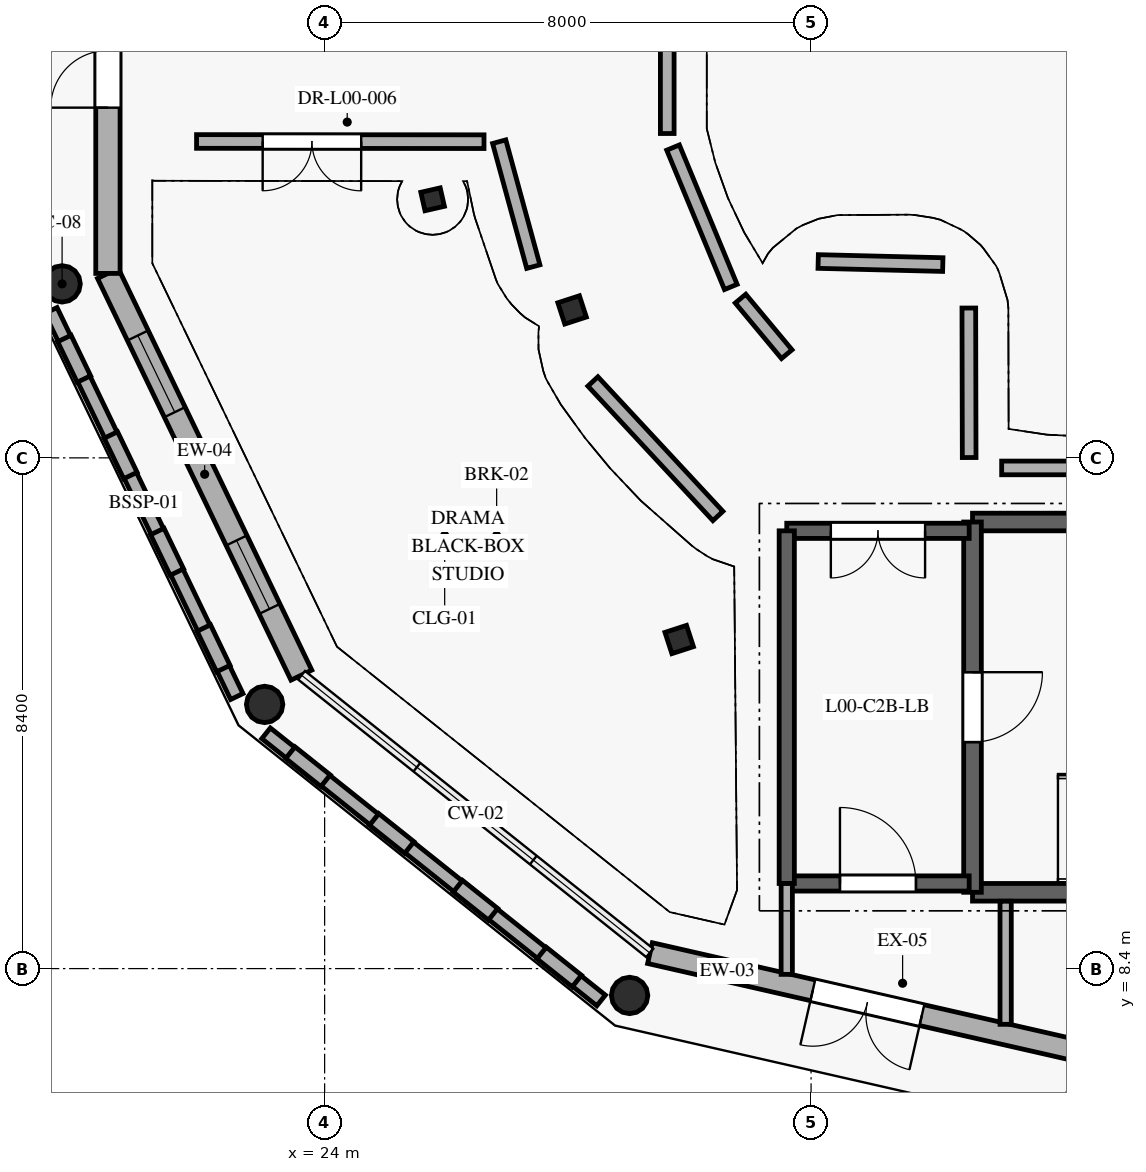
"""IFC4 building model, lengths in metres.
Left out: names, types, materials, properties, quantities, classifications, styles, units other than length and angle.
Written with IfcOpenShell. Run it as: python <this file> out.ifc"""

import sys

from ifc_helpers import new_model, si_unit, direction, frame, frame_2d, origin, origin_2d, place, context, subcontext, project, spatial, rectangle, circle, i_section, extrude, element, fill, save


model = new_model("IFC4")
c1 = context("Model", 3, precision=1e-05, world=origin(), true_north=direction((0.0, 1.0)))
c2 = subcontext(c1, "Body", "Model", "MODEL_VIEW")
j1 = project(units=[si_unit("LENGTHUNIT", "METRE"), si_unit("PLANEANGLEUNIT", "RADIAN")], contexts=[c1])
p1 = place(None, origin())
s1 = spatial("IfcSite", under=j1, at=p1, CompositionType="ELEMENT")
p2 = place(p1, origin())
s2 = spatial("IfcBuilding", under=s1, at=p2, CompositionType="ELEMENT")
p3 = place(p2, origin())
s3 = spatial("IfcBuildingStorey", under=s2, at=p3, CompositionType="ELEMENT", Elevation=0.0)
for number, where, z_axis, x_axis in (
    (1, (29.831, 13.812, 0.0), (0.0, 0.0, 1.0), (0.951, 0.309, 0.0)),
    (2, (28.07, 19.233, 0.0), (0.0, 0.0, 1.0), (0.951, 0.309, 0.0)),
):
    element("IfcColumn", number, at=place(p3, frame(where, z_axis=z_axis, x_axis=x_axis)), inside=s3, PredefinedType="COLUMN", context=c2, shape_type="SweptSolid", body=[
        extrude(i_section(OverallWidth=0.373, OverallDepth=0.368, WebThickness=0.014, FlangeThickness=0.024, FilletRadius=0.015, at=origin_2d()), origin(), (0.0, 0.0, 1.0), 4.2),
    ])
for number, where, z_axis, x_axis in (
    (3, (19.683, 19.662, 0.0), (0.0, 0.0, 1.0), (0.223, -0.975, 0.0)),
    (4, (23.013, 12.745, 0.0), (0.0, 0.0, 1.0), (0.623, -0.782, 0.0)),
    (5, (29.015, 7.958, 0.0), (0.0, 0.0, 1.0), (0.901, -0.434, 0.0)),
):
    element("IfcColumn", number, at=place(p3, frame(where, z_axis=z_axis, x_axis=x_axis)), inside=s3, PredefinedType="COLUMN", context=c2, shape_type="SweptSolid", body=[
        extrude(circle(Radius=0.3, at=origin_2d()), origin(), (0.0, 0.0, 1.0), 4.2),
    ])
p4 = place(p3, frame((25.776, 21.052, 0.0), z_axis=(0.0, 0.0, 1.0), x_axis=(0.222569549971, -0.974916814618, 0.0)))
e6 = element("IfcColumn", 6, at=p4, inside=s3, PredefinedType="COLUMN", context=c2, shape_type="SweptSolid", body=[
    extrude(i_section(OverallWidth=0.311, OverallDepth=0.327, WebThickness=0.016, FlangeThickness=0.025, FilletRadius=0.015, at=origin_2d()), origin(), (0.0, 0.0, 1.0), 4.2),
])
p5 = place(p3, frame((36.5, 7.023, 0.0), z_axis=(0.0, 0.0, 1.0), x_axis=(-0.974932633187, 0.222500248868, 0.0)))
e7 = element("IfcWall", 7, at=p5, inside=s3, PredefinedType="SOLIDWALL", context=c2, shape_type="SweptSolid", body=[
    extrude(rectangle(XDim=7.333, YDim=0.35, at=frame_2d((3.667, 0.0))), origin(), (0.0, 0.0, 1.0), 3.94),
])
p6 = place(p5, frame((2.747, 0.0, 0.0)))
e8 = element("IfcOpeningElement", 8, at=p6, cuts=e7, PredefinedType="OPENING", context=c2, shape_type="SweptSolid", body=[
    extrude(rectangle(XDim=1.84, YDim=2.16, at=frame_2d((0.92, 1.08))), frame((0.0, 0.185, 0.0), z_axis=(0.0, -1.0, 0.0), x_axis=(1.0, 0.0, 0.0)), (0.0, 0.0, 1.0), 0.37),
])
p7 = place(p3, frame((23.618, 13.227, 0.0), z_axis=(0.0, 0.0, 1.0), x_axis=(-0.433886691468, 0.900967446119, 0.0)))
e9 = element("IfcWall", 9, at=p7, inside=s3, PredefinedType="SOLIDWALL", context=c2, shape_type="SweptSolid", body=[
    extrude(rectangle(XDim=7.333, YDim=0.38, at=frame_2d((3.667, 0.0))), origin(), (0.0, 0.0, 1.0), 3.94),
])
p8 = place(p7, frame((1.208, 0.0, 0.85)))
e10 = element("IfcOpeningElement", 10, at=p8, cuts=e9, PredefinedType="OPENING", context=c2, shape_type="SweptSolid", body=[
    extrude(rectangle(XDim=1.25, YDim=1.4, at=frame_2d((0.625, 0.7))), frame((0.0, 0.2, 0.0), z_axis=(0.0, -1.0, 0.0), x_axis=(1.0, 0.0, 0.0)), (0.0, 0.0, 1.0), 0.4),
])
p9 = place(p7, frame((4.8, 0.0, 0.85)))
e11 = element("IfcOpeningElement", 11, at=p9, cuts=e9, PredefinedType="OPENING", context=c2, shape_type="SweptSolid", body=[
    extrude(rectangle(XDim=1.4, YDim=1.4, at=frame_2d((0.7, 0.7))), frame((0.0, 0.2, 0.0), z_axis=(0.0, -1.0, 0.0), x_axis=(1.0, 0.0, 0.0)), (0.0, 0.0, 1.0), 0.4),
])
p10 = place(p3, frame((20.436, 19.833, 0.0), z_axis=(0.0, 0.0, 1.0), x_axis=(0.0, 1.0, 0.0)))
e12 = element("IfcWall", 12, at=p10, inside=s3, PredefinedType="SOLIDWALL", context=c2, shape_type="SweptSolid", body=[
    extrude(rectangle(XDim=7.333, YDim=0.4, at=frame_2d((3.667, 0.0))), origin(), (0.0, 0.0, 1.0), 3.94),
])
p11 = place(p10, frame((2.726, 0.0, 0.0)))
e13 = element("IfcOpeningElement", 13, at=p11, cuts=e12, PredefinedType="OPENING", context=c2, shape_type="SweptSolid", body=[
    extrude(rectangle(XDim=1.88, YDim=2.18, at=frame_2d((0.94, 1.09))), frame((0.0, 0.21, 0.0), z_axis=(0.0, -1.0, 0.0), x_axis=(1.0, 0.0, 0.0)), (0.0, 0.0, 1.0), 0.42),
])
p12 = place(p3, frame((19.498, 19.223, 0.0), z_axis=(0.0, 0.0, 1.0), x_axis=(0.433873953058, -0.900973580555, 0.0)))
e14 = element("IfcWall", 14, at=p12, inside=s3, PredefinedType="ELEMENTEDWALL", context=c2, shape_type="SweptSolid", body=[
    extrude(rectangle(XDim=7.047, YDim=0.225, at=frame_2d((3.523, 0.0))), origin(), (0.0, 0.0, 1.0), 0.55),
])
for number, where, z_axis, x_axis in (
    (15, (19.72, 18.763, 0.55), (0.0, 0.0, 1.0), (0.434, -0.901, 0.0)),
    (16, (20.484, 17.176, 0.55), (0.0, 0.0, 1.0), (0.434, -0.901, 0.0)),
    (17, (21.249, 15.589, 0.55), (0.0, 0.0, 1.0), (0.434, -0.901, 0.0)),
    (18, (22.013, 14.001, 0.55), (0.0, 0.0, 1.0), (0.434, -0.901, 0.0)),
):
    element("IfcWall", number, at=place(p3, frame(where, z_axis=z_axis, x_axis=x_axis)), inside=s3, PredefinedType="ELEMENTEDWALL", context=c2, shape_type="SweptSolid", body=[
        extrude(rectangle(XDim=0.74, YDim=0.245, at=frame_2d((0.37, 0.0))), origin(), (0.0, 0.0, 1.0), 3.39),
    ])
p13 = place(p3, frame((23.037, 12.27, 0.0), z_axis=(0.0, 0.0, 1.0), x_axis=(0.781821002863, -0.623502942641, 0.0)))
e19 = element("IfcWall", 19, at=p13, inside=s3, PredefinedType="ELEMENTEDWALL", context=c2, shape_type="SweptSolid", body=[
    extrude(rectangle(XDim=7.047, YDim=0.225, at=frame_2d((3.524, 0.0))), origin(), (0.0, 0.0, 1.0), 0.55),
])
for number, where, z_axis, x_axis in (
    (20, (23.437, 11.952, 0.55), (0.0, 0.0, 1.0), (0.782, -0.623, 0.0)),
    (21, (24.814, 10.853, 0.55), (0.0, 0.0, 1.0), (0.782, -0.624, 0.0)),
    (22, (26.191, 9.755, 0.55), (0.0, 0.0, 1.0), (0.782, -0.623, 0.0)),
    (23, (27.569, 8.656, 0.55), (0.0, 0.0, 1.0), (0.782, -0.623, 0.0)),
):
    element("IfcWall", number, at=place(p3, frame(where, z_axis=z_axis, x_axis=x_axis)), inside=s3, PredefinedType="ELEMENTEDWALL", context=c2, shape_type="SweptSolid", body=[
        extrude(rectangle(XDim=0.74, YDim=0.245, at=frame_2d((0.37, 0.0))), origin(), (0.0, 0.0, 1.0), 3.39),
    ])
for number, where, z_axis, x_axis in (
    (24, (34.655, 9.655, 0.0), (0.0, 0.0, 1.0), (1.0, 0.0, 0.0)),
    (25, (41.445, 15.745, 0.0), (0.0, 0.0, 1.0), (-1.0, 0.0, 0.0)),
):
    element("IfcWall", number, at=place(p3, frame(where, z_axis=z_axis, x_axis=x_axis)), inside=s3, PredefinedType="SHEAR", context=c2, shape_type="SweptSolid", body=[
        extrude(rectangle(XDim=6.79, YDim=0.29, at=frame_2d((3.395, 0.0))), origin(), (0.0, 0.0, 1.0), 3.95),
    ])
p14 = place(p3, frame((34.655, 15.745, 0.0), z_axis=(0.0, 0.0, 1.0), x_axis=(0.0, -1.0, 0.0)))
e26 = element("IfcWall", 26, at=p14, inside=s3, PredefinedType="SHEAR", context=c2, shape_type="SweptSolid", body=[
    extrude(rectangle(XDim=6.09, YDim=0.29, at=frame_2d((3.045, 0.0))), origin(), (0.0, 0.0, 1.0), 3.95),
])
p15 = place(p14, frame((2.47, 0.0, 0.0)))
e27 = element("IfcOpeningElement", 27, at=p15, cuts=e26, PredefinedType="OPENING", context=c2, shape_type="SweptSolid", body=[
    extrude(rectangle(XDim=1.15, YDim=2.1, at=frame_2d((0.575, 1.05))), frame((0.0, 0.155, 0.0), z_axis=(0.0, -1.0, 0.0), x_axis=(1.0, 0.0, 0.0)), (0.0, 0.0, 1.0), 0.31),
])
p16 = place(p3, frame((31.6, 9.8, 0.0), z_axis=(0.0, 0.0, 1.0), x_axis=(1.0, 0.0, 0.0)))
e28 = element("IfcWall", 28, at=p16, inside=s3, PredefinedType="SHEAR", context=c2, shape_type="SweptSolid", body=[
    extrude(rectangle(XDim=3.0, YDim=0.25, at=frame_2d((1.5, 0.0))), origin(), (0.0, 0.0, 1.0), 3.95),
])
p17 = place(p16, frame((0.875, 0.0, 0.0)))
e29 = element("IfcOpeningElement", 29, at=p17, cuts=e28, PredefinedType="OPENING", context=c2, shape_type="SweptSolid", body=[
    extrude(rectangle(XDim=1.25, YDim=2.1, at=frame_2d((0.625, 1.05))), frame((0.0, 0.135, 0.0), z_axis=(0.0, -1.0, 0.0), x_axis=(1.0, 0.0, 0.0)), (0.0, 0.0, 1.0), 0.27),
])
p18 = place(p3, frame((34.6, 15.6, 0.0), z_axis=(0.0, 0.0, 1.0), x_axis=(-1.0, 0.0, 0.0)))
e30 = element("IfcWall", 30, at=p18, inside=s3, PredefinedType="SHEAR", context=c2, shape_type="SweptSolid", body=[
    extrude(rectangle(XDim=3.0, YDim=0.25, at=frame_2d((1.5, 0.0))), origin(), (0.0, 0.0, 1.0), 3.95),
])
p19 = place(p18, frame((0.725, 0.0, 0.0)))
e31 = element("IfcOpeningElement", 31, at=p19, cuts=e30, PredefinedType="OPENING", context=c2, shape_type="SweptSolid", body=[
    extrude(rectangle(XDim=1.55, YDim=2.15, at=frame_2d((0.775, 1.075))), frame((0.0, 0.135, 0.0), z_axis=(0.0, -1.0, 0.0), x_axis=(1.0, 0.0, 0.0)), (0.0, 0.0, 1.0), 0.27),
])
p20 = place(p3, frame((31.6, 15.6, 0.0), z_axis=(0.0, 0.0, 1.0), x_axis=(0.0, -1.0, 0.0)))
e32 = element("IfcWall", 32, at=p20, inside=s3, PredefinedType="SHEAR", context=c2, shape_type="SweptSolid", body=[
    extrude(rectangle(XDim=5.8, YDim=0.25, at=frame_2d((2.9, 0.0))), origin(), (0.0, 0.0, 1.0), 3.95),
])
p21 = place(p3, frame((35.2, 7.483, 0.0), z_axis=(0.0, 0.0, 1.0), x_axis=(0.0, 1.0, 0.0)))
e33 = element("IfcWall", 33, at=p21, inside=s3, PredefinedType="PARTITIONING", context=c2, shape_type="SweptSolid", body=[
    extrude(rectangle(XDim=2.025, YDim=0.185, at=frame_2d((1.012, 0.0))), origin(), (0.0, 0.0, 1.0), 3.93),
])
p22 = place(p3, frame((31.6, 9.799, 0.0), z_axis=(0.0, 0.0, 1.0), x_axis=(0.0, -1.0, 0.0)))
e34 = element("IfcWall", 34, at=p22, inside=s3, PredefinedType="PARTITIONING", context=c2, shape_type="SweptSolid", body=[
    extrude(rectangle(XDim=1.494, YDim=0.185, at=frame_2d((0.747, 0.0))), origin(), (0.0, 0.0, 1.0), 3.93),
])
p23 = place(p3, frame((30.468, 15.844, 0.0), z_axis=(0.0, 0.0, 1.0), x_axis=(-0.680599903588, 0.732655288138, 0.0)))
e35 = element("IfcWall", 35, at=p23, inside=s3, PredefinedType="PARTITIONING", context=c2, shape_type="SweptSolid", body=[
    extrude(rectangle(XDim=3.02, YDim=0.225, at=frame_2d((1.51, 0.0))), origin(), (0.0, 0.0, 1.0), 3.93),
])
p24 = place(p3, frame((27.432, 19.945, 0.0), z_axis=(0.0, 0.0, 1.0), x_axis=(-0.263515032184, 0.964655289631, 0.0)))
e36 = element("IfcWall", 36, at=p24, inside=s3, PredefinedType="PARTITIONING", context=c2, shape_type="SweptSolid", body=[
    extrude(rectangle(XDim=2.13, YDim=0.225, at=frame_2d((1.065, 0.0))), origin(), (0.0, 0.0, 1.0), 3.93),
])
p25 = place(p3, frame((26.621, 22.0, 0.0), z_axis=(0.0, 0.0, 1.0), x_axis=(-0.999999738615, 0.000723028267, 0.0)))
e37 = element("IfcWall", 37, at=p25, inside=s3, PredefinedType="PARTITIONING", context=c2, shape_type="SweptSolid", body=[
    extrude(rectangle(XDim=4.727, YDim=0.225, at=frame_2d((2.364, 0.0))), origin(), (0.0, 0.0, 1.0), 3.93),
])
p26 = place(p25, frame((2.02, 0.0, 0.0)))
e38 = element("IfcOpeningElement", 38, at=p26, cuts=e37, PredefinedType="OPENING", context=c2, shape_type="SweptSolid", body=[
    extrude(rectangle(XDim=1.62, YDim=2.18, at=frame_2d((0.81, 1.09))), frame((0.0, 0.123, 0.0), z_axis=(0.0, -1.0, 0.0), x_axis=(1.0, 0.0, 0.0)), (0.0, 0.0, 1.0), 0.245),
])
p27 = place(p3, frame((29.635, 24.615, 0.0), z_axis=(0.0, 0.0, 1.0), x_axis=(0.0, -1.0, 0.0)))
e39 = element("IfcWall", 39, at=p27, inside=s3, PredefinedType="PARTITIONING", context=c2, shape_type="SweptSolid", body=[
    extrude(rectangle(XDim=2.481, YDim=0.225, at=frame_2d((1.24, 0.0))), origin(), (0.0, 0.0, 1.0), 3.93),
])
p28 = place(p3, frame((29.73, 21.903, 0.0), z_axis=(0.0, 0.0, 1.0), x_axis=(0.382679137355, -0.923881311551, 0.0)))
e40 = element("IfcWall", 40, at=p28, inside=s3, PredefinedType="PARTITIONING", context=c2, shape_type="SweptSolid", body=[
    extrude(rectangle(XDim=2.481, YDim=0.225, at=frame_2d((1.241, 0.0))), origin(), (0.0, 0.0, 1.0), 3.93),
])
p29 = place(p3, frame((30.84, 19.419, 0.0), z_axis=(0.0, 0.0, 1.0), x_axis=(0.63967929126, -0.76864192205, 0.0)))
e41 = element("IfcWall", 41, at=p29, inside=s3, PredefinedType="PARTITIONING", context=c2, shape_type="SweptSolid", body=[
    extrude(rectangle(XDim=1.189, YDim=0.225, at=frame_2d((0.594, 0.0))), origin(), (0.0, 0.0, 1.0), 3.93),
])
p30 = place(p3, frame((32.117, 20.03, 0.0), z_axis=(0.0, 0.0, 1.0), x_axis=(0.999695996787, -0.024655912229, 0.0)))
e42 = element("IfcWall", 42, at=p30, inside=s3, PredefinedType="PARTITIONING", context=c2, shape_type="SweptSolid", body=[
    extrude(rectangle(XDim=2.05, YDim=0.225, at=frame_2d((1.025, 0.0))), origin(), (0.0, 0.0, 1.0), 3.93),
])
p31 = place(p3, frame((34.594, 19.264, 0.0), z_axis=(0.0, 0.0, 1.0), x_axis=(0.002283325727, -0.999997393208, 0.0)))
e43 = element("IfcWall", 43, at=p31, inside=s3, PredefinedType="PARTITIONING", context=c2, shape_type="SweptSolid", body=[
    extrude(rectangle(XDim=2.459, YDim=0.225, at=frame_2d((1.229, 0.0))), origin(), (0.0, 0.0, 1.0), 3.93),
])
p32 = place(p3, frame((35.135, 16.635, 0.0), z_axis=(0.0, 0.0, 1.0), x_axis=(1.0, 0.0, 0.0)))
e44 = element("IfcWall", 44, at=p32, inside=s3, PredefinedType="PARTITIONING", context=c2, shape_type="SweptSolid", body=[
    extrude(rectangle(XDim=2.731, YDim=0.225, at=frame_2d((1.365, 0.0))), origin(), (0.0, 0.0, 1.0), 3.249),
])
p33 = place(p11, origin())
e45 = element("IfcDoor", 45, at=p33, inside=s3, OperationType="DOUBLE_DOOR_SINGLE_SWING", PredefinedType="DOOR", context=c2, shape_type="SweptSolid", body=[
    extrude(rectangle(XDim=1.88, YDim=2.18, at=frame_2d((0.94, 1.09))), frame((0.0, 0.025, 0.0), z_axis=(0.0, -1.0, 0.0), x_axis=(1.0, 0.0, 0.0)), (0.0, 0.0, 1.0), 0.05),
])
fill(e13, e45)
p34 = place(p6, origin())
e46 = element("IfcDoor", 46, at=p34, inside=s3, OperationType="DOUBLE_DOOR_SINGLE_SWING", PredefinedType="DOOR", context=c2, shape_type="SweptSolid", body=[
    extrude(rectangle(XDim=1.84, YDim=2.16, at=frame_2d((0.92, 1.08))), frame((0.0, 0.025, 0.0), z_axis=(0.0, -1.0, 0.0), x_axis=(1.0, 0.0, 0.0)), (0.0, 0.0, 1.0), 0.05),
])
fill(e8, e46)
p35 = place(p8, origin())
e47 = element("IfcWindow", 47, at=p35, inside=s3, PartitioningType="SINGLE_PANEL", PredefinedType="WINDOW", context=c2, shape_type="SweptSolid", body=[
    extrude(rectangle(XDim=1.25, YDim=1.4, at=frame_2d((0.625, 0.7))), frame((0.0, 0.03, 0.0), z_axis=(0.0, -1.0, 0.0), x_axis=(1.0, 0.0, 0.0)), (0.0, 0.0, 1.0), 0.06),
])
fill(e10, e47)
p36 = place(p9, origin())
e48 = element("IfcWindow", 48, at=p36, inside=s3, PartitioningType="SINGLE_PANEL", PredefinedType="WINDOW", context=c2, shape_type="SweptSolid", body=[
    extrude(rectangle(XDim=1.4, YDim=1.4, at=frame_2d((0.7, 0.7))), frame((0.0, 0.03, 0.0), z_axis=(0.0, -1.0, 0.0), x_axis=(1.0, 0.0, 0.0)), (0.0, 0.0, 1.0), 0.06),
])
fill(e11, e48)
p37 = place(p15, frame((1.15, 0.0, 0.0), z_axis=(0.0, 0.0, 1.0), x_axis=(-1.0, 0.0, 0.0)))
e49 = element("IfcDoor", 49, at=p37, inside=s3, OperationType="SINGLE_SWING_LEFT", PredefinedType="DOOR", context=c2, shape_type="SweptSolid", body=[
    extrude(rectangle(XDim=1.15, YDim=2.1, at=frame_2d((0.575, 1.05))), frame((0.0, 0.025, 0.0), z_axis=(0.0, -1.0, 0.0), x_axis=(1.0, 0.0, 0.0)), (0.0, 0.0, 1.0), 0.05),
])
fill(e27, e49)
p38 = place(p17, frame((1.25, 0.0, 0.0), z_axis=(0.0, 0.0, 1.0), x_axis=(-1.0, 0.0, 0.0)))
e50 = element("IfcDoor", 50, at=p38, inside=s3, OperationType="SINGLE_SWING_LEFT", PredefinedType="DOOR", context=c2, shape_type="SweptSolid", body=[
    extrude(rectangle(XDim=1.25, YDim=2.1, at=frame_2d((0.625, 1.05))), frame((0.0, 0.025, 0.0), z_axis=(0.0, -1.0, 0.0), x_axis=(1.0, 0.0, 0.0)), (0.0, 0.0, 1.0), 0.05),
])
fill(e29, e50)
p39 = place(p19, frame((1.55, 0.0, 0.0), z_axis=(0.0, 0.0, 1.0), x_axis=(-1.0, 0.0, 0.0)))
e51 = element("IfcDoor", 51, at=p39, inside=s3, OperationType="DOUBLE_DOOR_SINGLE_SWING", PredefinedType="DOOR", context=c2, shape_type="SweptSolid", body=[
    extrude(rectangle(XDim=1.55, YDim=2.15, at=frame_2d((0.775, 1.075))), frame((0.0, 0.025, 0.0), z_axis=(0.0, -1.0, 0.0), x_axis=(1.0, 0.0, 0.0)), (0.0, 0.0, 1.0), 0.05),
])
fill(e31, e51)
p40 = place(p26, origin())
e52 = element("IfcDoor", 52, at=p40, inside=s3, OperationType="DOUBLE_DOOR_SINGLE_SWING", PredefinedType="DOOR", context=c2, shape_type="SweptSolid", body=[
    extrude(rectangle(XDim=1.62, YDim=2.18, at=frame_2d((0.81, 1.09))), frame((0.0, 0.025, 0.0), z_axis=(0.0, -1.0, 0.0), x_axis=(1.0, 0.0, 0.0)), (0.0, 0.0, 1.0), 0.05),
])
fill(e38, e52)
save(model, sys.argv[1])
